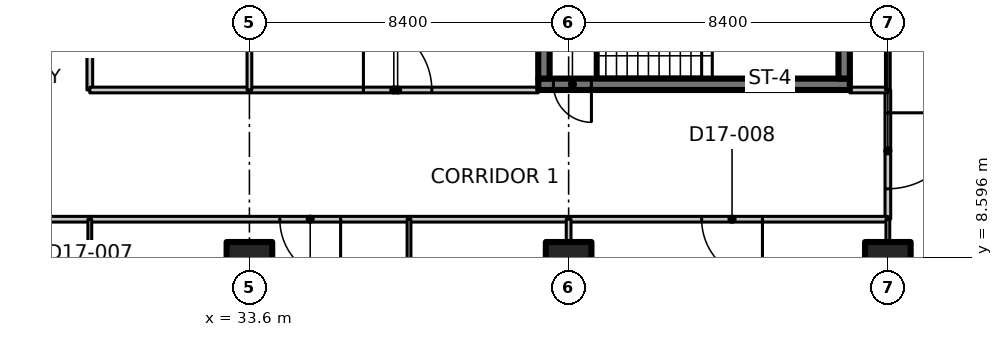
"""IFC4 building model, lengths in metres.
Left out: names, types, materials, properties, quantities, classifications, styles, units other than length and angle.
Written with IfcOpenShell. Run it as: python <this file> out.ifc"""

import sys

from ifc_helpers import new_model, si_unit, direction, frame, frame_2d, origin, origin_2d, place, context, subcontext, project, spatial, rectangle, extrude, element, fill, save


model = new_model("IFC4")
c1 = context("Model", 3, precision=1e-05, world=origin(), true_north=direction((0.0, 1.0)))
c2 = subcontext(c1, "Body", "Model", "MODEL_VIEW")
j1 = project(units=[si_unit("LENGTHUNIT", "METRE"), si_unit("PLANEANGLEUNIT", "RADIAN")], contexts=[c1])
p1 = place(None, origin())
s1 = spatial("IfcSite", under=j1, at=p1, CompositionType="ELEMENT")
p2 = place(p1, origin())
s2 = spatial("IfcBuilding", under=s1, at=p2, CompositionType="ELEMENT")
p3 = place(p2, frame((0.0, 0.0, 142.1)))
s3 = spatial("IfcBuildingStorey", under=s2, at=p3, CompositionType="ELEMENT", Elevation=142.1)
for number, where, z_axis, x_axis in (
    (1, (33.6, 8.4, 0.0), (0.0, 0.0, 1.0), (1.0, 0.0, 0.0)),
    (2, (42.0, 8.4, 0.0), (0.0, 0.0, 1.0), (1.0, 0.0, 0.0)),
    (3, (50.4, 8.4, 0.0), (0.0, 0.0, 1.0), (1.0, 0.0, 0.0)),
):
    element("IfcColumn", number, at=place(p3, frame(where, z_axis=z_axis, x_axis=x_axis)), inside=s3, PredefinedType="COLUMN", context=c2, shape_type="SweptSolid", body=[
        extrude(rectangle(XDim=1.2, YDim=1.2, at=origin_2d()), origin(), (0.0, 0.0, 1.0), 3.35),
    ])
p4 = place(p3, frame((49.4, 13.15, 0.0), z_axis=(0.0, 0.0, 1.0), x_axis=(-1.0, 0.0, 0.0)))
e4 = element("IfcWall", 4, at=p4, inside=s3, PredefinedType="SHEAR", context=c2, shape_type="SweptSolid", body=[
    extrude(rectangle(XDim=8.2, YDim=0.3, at=frame_2d((4.1, 0.0))), origin(), (0.0, 0.0, 1.0), 3.35),
])
p5 = place(p4, frame((6.8, 0.0, 0.0)))
e5 = element("IfcOpeningElement", 5, at=p5, cuts=e4, PredefinedType="OPENING", context=c2, shape_type="SweptSolid", body=[
    extrude(rectangle(XDim=1.0, YDim=2.1, at=frame_2d((0.5, 1.05))), frame((0.0, 0.16, 0.0), z_axis=(0.0, -1.0, 0.0), x_axis=(1.0, 0.0, 0.0)), (0.0, 0.0, 1.0), 0.32),
])
for number, where, z_axis, x_axis in (
    (6, (41.35, 13.3, 0.0), (0.0, 0.0, 1.0), (0.0, 1.0, 0.0)),
    (7, (49.25, 13.3, 0.0), (0.0, 0.0, 1.0), (0.0, 1.0, 0.0)),
):
    element("IfcWall", number, at=place(p3, frame(where, z_axis=z_axis, x_axis=x_axis)), inside=s3, PredefinedType="SHEAR", context=c2, shape_type="SweptSolid", body=[
        extrude(rectangle(XDim=2.55, YDim=0.3, at=frame_2d((1.275, 0.0))), origin(), (0.0, 0.0, 1.0), 3.35),
    ])
p6 = place(p3, frame((29.4, 9.6, 0.0), z_axis=(0.0, 0.0, 1.0), x_axis=(-1.0, 0.0, 0.0)))
e8 = element("IfcWall", 8, at=p6, inside=s3, PredefinedType="PARTITIONING", context=c2, shape_type="SweptSolid", body=[
    extrude(rectangle(XDim=4.2, YDim=0.15, at=frame_2d((2.1, 0.0))), origin(), (0.0, 0.0, 1.0), 3.33),
])
p7 = place(p3, frame((29.4, 21.2, 0.0), z_axis=(0.0, 0.0, 1.0), x_axis=(0.0, -1.0, 0.0)))
e9 = element("IfcWall", 9, at=p7, inside=s3, PredefinedType="PARTITIONING", context=c2, shape_type="SweptSolid", body=[
    extrude(rectangle(XDim=8.2, YDim=0.15, at=frame_2d((4.1, 0.0))), origin(), (0.0, 0.0, 1.0), 3.33),
])
p8 = place(p7, frame((3.3, 0.0, 0.0)))
e10 = element("IfcOpeningElement", 10, at=p8, cuts=e9, PredefinedType="OPENING", context=c2, shape_type="SweptSolid", body=[
    extrude(rectangle(XDim=1.6, YDim=2.1, at=frame_2d((0.8, 1.05))), frame((0.0, 0.085, 0.0), z_axis=(0.0, -1.0, 0.0), x_axis=(1.0, 0.0, 0.0)), (0.0, 0.0, 1.0), 0.17),
])
p9 = place(p3, frame((50.4, 13.0, 0.0), z_axis=(0.0, 0.0, 1.0), x_axis=(0.0, -1.0, 0.0)))
e11 = element("IfcWall", 11, at=p9, inside=s3, PredefinedType="PARTITIONING", context=c2, shape_type="SweptSolid", body=[
    extrude(rectangle(XDim=3.4, YDim=0.15, at=frame_2d((1.7, 0.0))), origin(), (0.0, 0.0, 1.0), 3.33),
])
p10 = place(p9, frame((0.6, 0.0, 0.0)))
e12 = element("IfcOpeningElement", 12, at=p10, cuts=e11, PredefinedType="OPENING", context=c2, shape_type="SweptSolid", body=[
    extrude(rectangle(XDim=2.0, YDim=2.4, at=frame_2d((1.0, 1.2))), frame((0.0, 0.085, 0.0), z_axis=(0.0, -1.0, 0.0), x_axis=(1.0, 0.0, 0.0)), (0.0, 0.0, 1.0), 0.17),
])
p11 = place(p3, frame((37.8, 9.6, 0.0), z_axis=(0.0, 0.0, 1.0), x_axis=(-1.0, 0.0, 0.0)))
e13 = element("IfcWall", 13, at=p11, inside=s3, PredefinedType="PARTITIONING", context=c2, shape_type="SweptSolid", body=[
    extrude(rectangle(XDim=8.4, YDim=0.15, at=frame_2d((4.2, 0.0))), origin(), (0.0, 0.0, 1.0), 3.33),
])
p12 = place(p11, frame((1.8, 0.0, 0.0)))
e14 = element("IfcOpeningElement", 14, at=p12, cuts=e13, PredefinedType="OPENING", context=c2, shape_type="SweptSolid", body=[
    extrude(rectangle(XDim=1.6, YDim=2.1, at=frame_2d((0.8, 1.05))), frame((0.0, 0.085, 0.0), z_axis=(0.0, -1.0, 0.0), x_axis=(1.0, 0.0, 0.0)), (0.0, 0.0, 1.0), 0.17),
])
p13 = place(p3, frame((42.0, 9.6, 0.0), z_axis=(0.0, 0.0, 1.0), x_axis=(-1.0, 0.0, 0.0)))
e15 = element("IfcWall", 15, at=p13, inside=s3, PredefinedType="PARTITIONING", context=c2, shape_type="SweptSolid", body=[
    extrude(rectangle(XDim=4.2, YDim=0.15, at=frame_2d((2.1, 0.0))), origin(), (0.0, 0.0, 1.0), 3.33),
])
p14 = place(p3, frame((50.4, 9.6, 0.0), z_axis=(0.0, 0.0, 1.0), x_axis=(-1.0, 0.0, 0.0)))
e16 = element("IfcWall", 16, at=p14, inside=s3, PredefinedType="PARTITIONING", context=c2, shape_type="SweptSolid", body=[
    extrude(rectangle(XDim=8.4, YDim=0.15, at=frame_2d((4.2, 0.0))), origin(), (0.0, 0.0, 1.0), 3.33),
])
p15 = place(p14, frame((3.3, 0.0, 0.0)))
e17 = element("IfcOpeningElement", 17, at=p15, cuts=e16, PredefinedType="OPENING", context=c2, shape_type="SweptSolid", body=[
    extrude(rectangle(XDim=1.6, YDim=2.1, at=frame_2d((0.8, 1.05))), frame((0.0, 0.085, 0.0), z_axis=(0.0, -1.0, 0.0), x_axis=(1.0, 0.0, 0.0)), (0.0, 0.0, 1.0), 0.17),
])
p16 = place(p3, frame((29.4, 13.0, 0.0), z_axis=(0.0, 0.0, 1.0), x_axis=(1.0, 0.0, 0.0)))
e18 = element("IfcWall", 18, at=p16, inside=s3, PredefinedType="PARTITIONING", context=c2, shape_type="SweptSolid", body=[
    extrude(rectangle(XDim=4.2, YDim=0.15, at=frame_2d((2.1, 0.0))), origin(), (0.0, 0.0, 1.0), 3.33),
])
p17 = place(p3, frame((33.6, 13.0, 0.0), z_axis=(0.0, 0.0, 1.0), x_axis=(1.0, 0.0, 0.0)))
e19 = element("IfcWall", 19, at=p17, inside=s3, PredefinedType="PARTITIONING", context=c2, shape_type="SweptSolid", body=[
    extrude(rectangle(XDim=7.6, YDim=0.15, at=frame_2d((3.8, 0.0))), origin(), (0.0, 0.0, 1.0), 3.33),
])
p18 = place(p17, frame((3.0, 0.0, 0.0)))
e20 = element("IfcOpeningElement", 20, at=p18, cuts=e19, PredefinedType="OPENING", context=c2, shape_type="SweptSolid", body=[
    extrude(rectangle(XDim=1.8, YDim=2.1, at=frame_2d((0.9, 1.05))), frame((0.0, 0.085, 0.0), z_axis=(0.0, -1.0, 0.0), x_axis=(1.0, 0.0, 0.0)), (0.0, 0.0, 1.0), 0.17),
])
p19 = place(p3, frame((49.4, 13.0, 0.0), z_axis=(0.0, 0.0, 1.0), x_axis=(1.0, 0.0, 0.0)))
e21 = element("IfcWall", 21, at=p19, inside=s3, PredefinedType="PARTITIONING", context=c2, shape_type="SweptSolid", body=[
    extrude(rectangle(XDim=1.0, YDim=0.15, at=frame_2d((0.5, 0.0))), origin(), (0.0, 0.0, 1.0), 3.33),
])
p20 = place(p3, frame((50.4, 9.02, 0.0), z_axis=(0.0, 0.0, 1.0), x_axis=(0.0, 1.0, 0.0)))
e22 = element("IfcWall", 22, at=p20, inside=s3, PredefinedType="PARTITIONING", context=c2, shape_type="SweptSolid", body=[
    extrude(rectangle(XDim=0.58, YDim=0.1, at=frame_2d((0.29, 0.0))), origin(), (0.0, 0.0, 1.0), 3.33),
])
p21 = place(p3, frame((50.4, 13.0, 0.0), z_axis=(0.0, 0.0, 1.0), x_axis=(0.0, 1.0, 0.0)))
e23 = element("IfcWall", 23, at=p21, inside=s3, PredefinedType="PARTITIONING", context=c2, shape_type="SweptSolid", body=[
    extrude(rectangle(XDim=3.18, YDim=0.125, at=frame_2d((1.59, 0.0))), origin(), (0.0, 0.0, 1.0), 3.33),
])
p22 = place(p3, frame((37.8, 9.6, 0.0), z_axis=(0.0, 0.0, 1.0), x_axis=(0.0, -1.0, 0.0)))
e24 = element("IfcWall", 24, at=p22, inside=s3, PredefinedType="PARTITIONING", context=c2, shape_type="SweptSolid", body=[
    extrude(rectangle(XDim=7.2, YDim=0.1, at=frame_2d((3.6, 0.0))), origin(), (0.0, 0.0, 1.0), 3.33),
])
p23 = place(p22, frame((3.0, 0.0, 0.0)))
e25 = element("IfcOpeningElement", 25, at=p23, cuts=e24, PredefinedType="OPENING", context=c2, shape_type="SweptSolid", body=[
    extrude(rectangle(XDim=1.0, YDim=2.1, at=frame_2d((0.5, 1.05))), frame((0.0, 0.06, 0.0), z_axis=(0.0, -1.0, 0.0), x_axis=(1.0, 0.0, 0.0)), (0.0, 0.0, 1.0), 0.12),
])
p24 = place(p3, frame((29.4, 3.6, 0.0), z_axis=(0.0, 0.0, 1.0), x_axis=(0.0, 1.0, 0.0)))
e26 = element("IfcWall", 26, at=p24, inside=s3, PredefinedType="PARTITIONING", context=c2, shape_type="SweptSolid", body=[
    extrude(rectangle(XDim=6.0, YDim=0.1, at=frame_2d((3.0, 0.0))), origin(), (0.0, 0.0, 1.0), 3.33),
])
p25 = place(p24, frame((2.4, 0.0, 0.0)))
e27 = element("IfcOpeningElement", 27, at=p25, cuts=e26, PredefinedType="OPENING", context=c2, shape_type="SweptSolid", body=[
    extrude(rectangle(XDim=1.0, YDim=2.1, at=frame_2d((0.5, 1.05))), frame((0.0, 0.06, 0.0), z_axis=(0.0, -1.0, 0.0), x_axis=(1.0, 0.0, 0.0)), (0.0, 0.0, 1.0), 0.12),
])
p26 = place(p3, frame((42.0, 9.6, 0.0), z_axis=(0.0, 0.0, 1.0), x_axis=(0.0, -1.0, 0.0)))
e28 = element("IfcWall", 28, at=p26, inside=s3, PredefinedType="PARTITIONING", context=c2, shape_type="SweptSolid", body=[
    extrude(rectangle(XDim=0.58, YDim=0.125, at=frame_2d((0.29, 0.0))), origin(), (0.0, 0.0, 1.0), 3.33),
])
p27 = place(p3, frame((33.6, 16.18, 0.0), z_axis=(0.0, 0.0, 1.0), x_axis=(0.0, -1.0, 0.0)))
e29 = element("IfcWall", 29, at=p27, inside=s3, PredefinedType="PARTITIONING", context=c2, shape_type="SweptSolid", body=[
    extrude(rectangle(XDim=3.18, YDim=0.125, at=frame_2d((1.59, 0.0))), origin(), (0.0, 0.0, 1.0), 3.33),
])
p28 = place(p5, origin())
e30 = element("IfcDoor", 30, at=p28, inside=s3, OperationType="SINGLE_SWING_LEFT", PredefinedType="DOOR", context=c2, shape_type="SweptSolid", body=[
    extrude(rectangle(XDim=1.0, YDim=2.1, at=frame_2d((0.5, 1.05))), frame((0.0, 0.025, 0.0), z_axis=(0.0, -1.0, 0.0), x_axis=(1.0, 0.0, 0.0)), (0.0, 0.0, 1.0), 0.05),
])
fill(e5, e30)
p29 = place(p10, origin())
e31 = element("IfcDoor", 31, at=p29, inside=s3, OperationType="DOUBLE_DOOR_SINGLE_SWING", PredefinedType="DOOR", context=c2, shape_type="SweptSolid", body=[
    extrude(rectangle(XDim=2.0, YDim=2.4, at=frame_2d((1.0, 1.2))), frame((0.0, 0.025, 0.0), z_axis=(0.0, -1.0, 0.0), x_axis=(1.0, 0.0, 0.0)), (0.0, 0.0, 1.0), 0.05),
])
fill(e12, e31)
p30 = place(p12, origin())
e32 = element("IfcDoor", 32, at=p30, inside=s3, OperationType="DOUBLE_DOOR_SINGLE_SWING", PredefinedType="DOOR", context=c2, shape_type="SweptSolid", body=[
    extrude(rectangle(XDim=1.6, YDim=2.1, at=frame_2d((0.8, 1.05))), frame((0.0, 0.025, 0.0), z_axis=(0.0, -1.0, 0.0), x_axis=(1.0, 0.0, 0.0)), (0.0, 0.0, 1.0), 0.05),
])
fill(e14, e32)
p31 = place(p15, origin())
e33 = element("IfcDoor", 33, at=p31, inside=s3, OperationType="DOUBLE_DOOR_SINGLE_SWING", PredefinedType="DOOR", context=c2, shape_type="SweptSolid", body=[
    extrude(rectangle(XDim=1.6, YDim=2.1, at=frame_2d((0.8, 1.05))), frame((0.0, 0.025, 0.0), z_axis=(0.0, -1.0, 0.0), x_axis=(1.0, 0.0, 0.0)), (0.0, 0.0, 1.0), 0.05),
])
fill(e17, e33)
p32 = place(p18, origin())
e34 = element("IfcDoor", 34, at=p32, inside=s3, OperationType="DOUBLE_DOOR_SINGLE_SWING", PredefinedType="DOOR", context=c2, shape_type="SweptSolid", body=[
    extrude(rectangle(XDim=1.8, YDim=2.1, at=frame_2d((0.9, 1.05))), frame((0.0, 0.025, 0.0), z_axis=(0.0, -1.0, 0.0), x_axis=(1.0, 0.0, 0.0)), (0.0, 0.0, 1.0), 0.05),
])
fill(e20, e34)
save(model, sys.argv[1])
